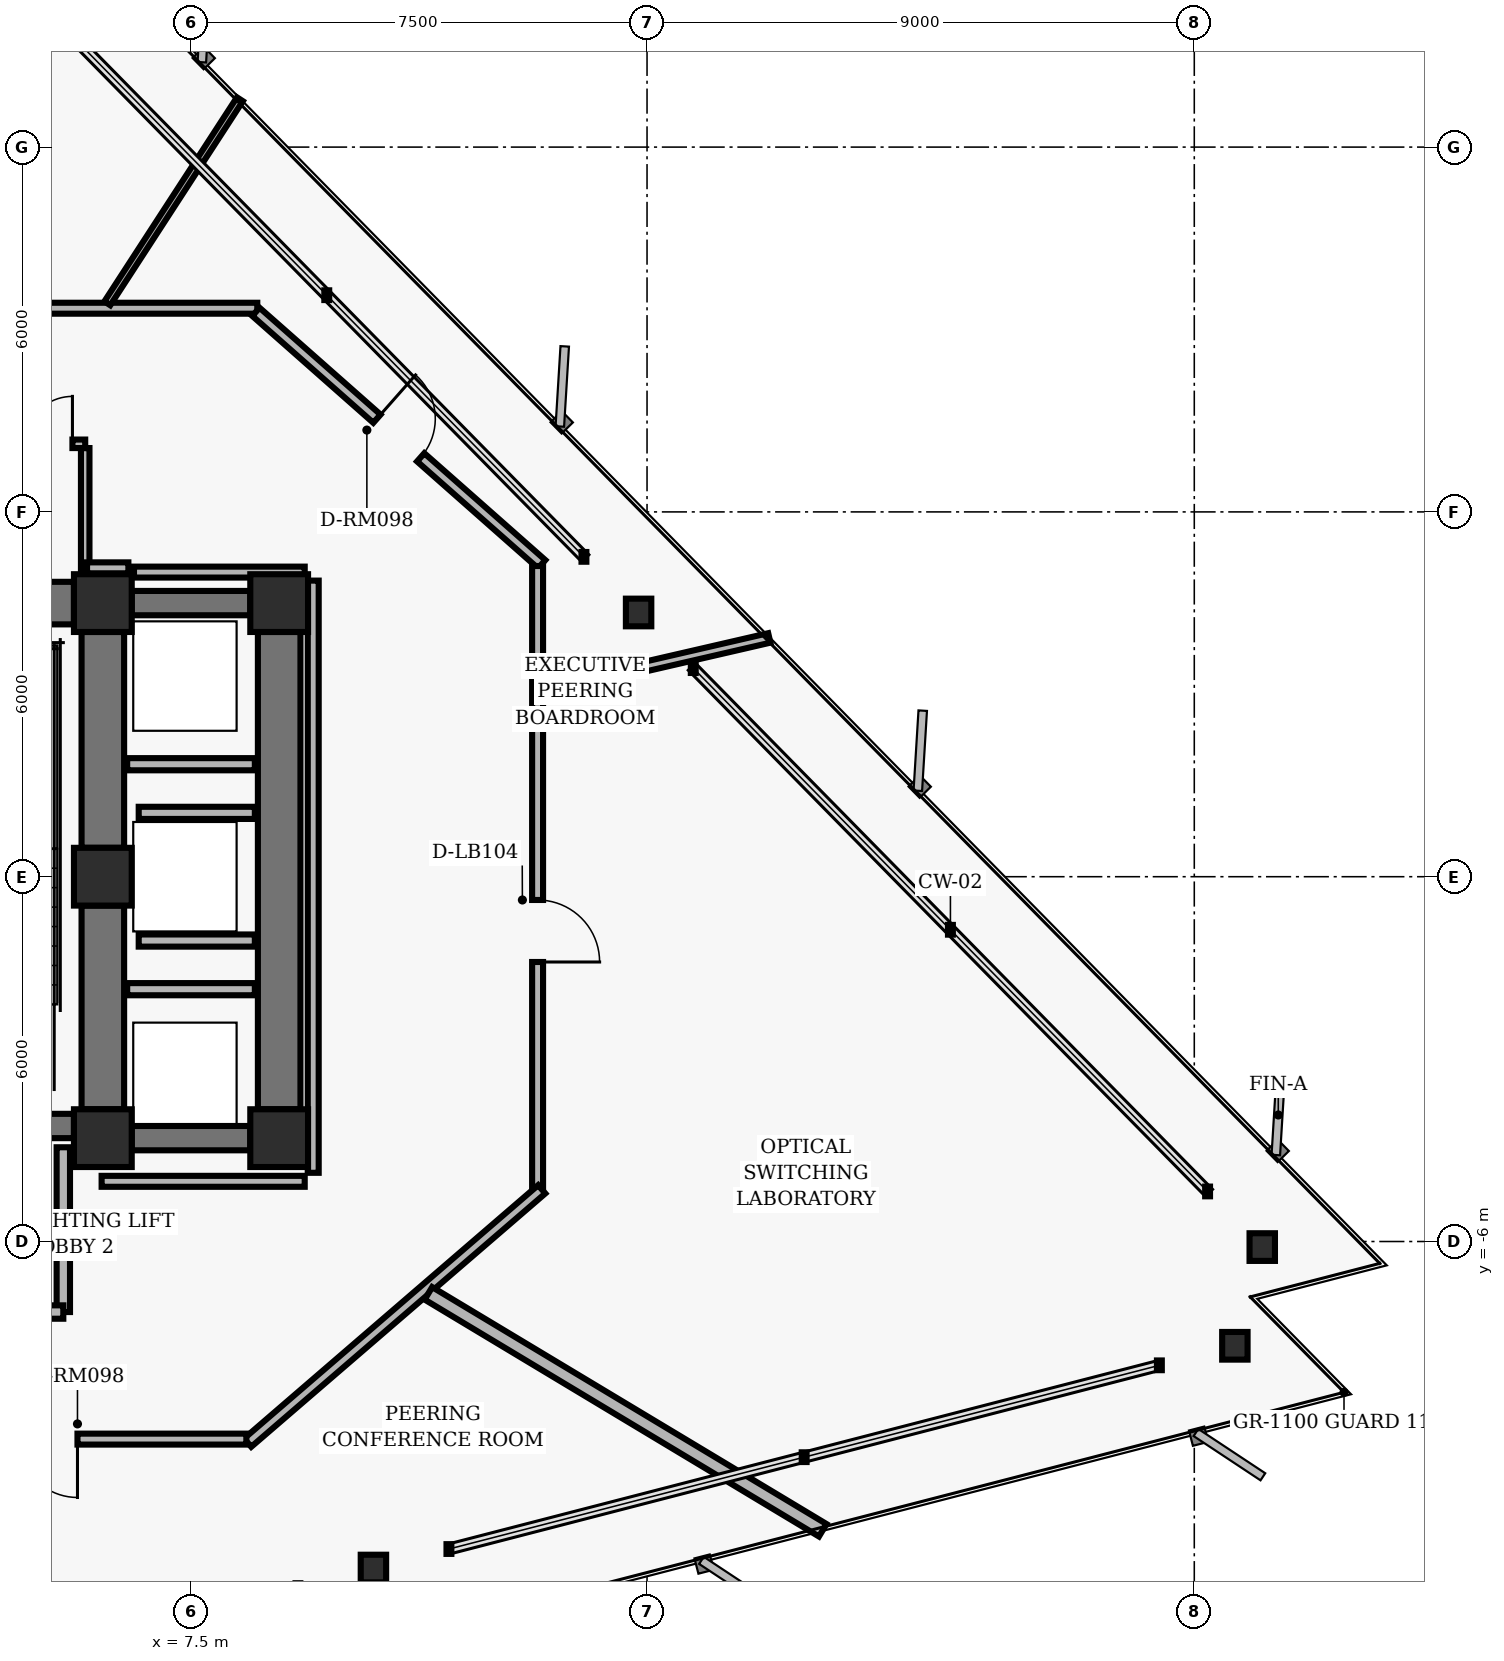
"""IFC4 building model, lengths in metres.
Left out: names, types, materials, properties, quantities, classifications, styles, units other than length and angle.
Written with IfcOpenShell. Run it as: python <this file> out.ifc"""

import sys

from ifc_helpers import new_model, si_unit, direction, frame, frame_2d, origin, origin_2d, place, context, subcontext, project, spatial, rectangle, hollow_rectangle, i_section, extrude, element, fill, save


model = new_model("IFC4")
c1 = context("Model", 3, precision=1e-05, world=origin(), true_north=direction((0.0, 1.0)))
c2 = subcontext(c1, "Body", "Model", "MODEL_VIEW")
j1 = project(units=[si_unit("LENGTHUNIT", "METRE"), si_unit("PLANEANGLEUNIT", "RADIAN")], contexts=[c1])
p1 = place(None, origin())
s1 = spatial("IfcSite", under=j1, at=p1, CompositionType="ELEMENT")
p2 = place(p1, origin())
s2 = spatial("IfcBuilding", under=s1, at=p2, CompositionType="ELEMENT")
p3 = place(p2, frame((0.0, 0.0, 76.48)))
s3 = spatial("IfcBuildingStorey", under=s2, at=p3, CompositionType="ELEMENT", Elevation=76.48)
for number, where, z_axis, x_axis in (
    (1, (6.05, 4.5, 0.0), (0.0, 0.0, 1.0), (1.0, 0.0, 0.0)),
    (2, (6.05, 0.0, 0.0), (0.0, 0.0, 1.0), (1.0, 0.0, 0.0)),
    (3, (6.05, -4.3, 0.0), (0.0, 0.0, 1.0), (1.0, 0.0, 0.0)),
    (4, (8.95, 4.5, 0.0), (0.0, 0.0, 1.0), (1.0, 0.0, 0.0)),
    (5, (8.95, -4.3, 0.0), (0.0, 0.0, 1.0), (1.0, 0.0, 0.0)),
):
    element("IfcColumn", number, at=place(p3, frame(where, z_axis=z_axis, x_axis=x_axis)), inside=s3, PredefinedType="COLUMN", context=c2, shape_type="SweptSolid", body=[
        extrude(hollow_rectangle(XDim=0.95, YDim=0.95, WallThickness=0.06, InnerFilletRadius=0.02, OuterFilletRadius=0.04, at=origin_2d()), origin(), (0.0, 0.0, 1.0), 3.04),
    ])
p4 = place(p3, frame((6.05, 0.475, 0.0), z_axis=(0.0, 0.0, 1.0), x_axis=(0.0, 1.0, 0.0)))
e6 = element("IfcWall", 6, at=p4, inside=s3, PredefinedType="SHEAR", context=c2, shape_type="SweptSolid", body=[
    extrude(rectangle(XDim=3.55, YDim=0.7, at=frame_2d((1.775, 0.0))), origin(), (0.0, 0.0, 1.0), 2.788),
])
p5 = place(p3, frame((6.05, -3.825, 0.0), z_axis=(0.0, 0.0, 1.0), x_axis=(0.0, 1.0, 0.0)))
e7 = element("IfcWall", 7, at=p5, inside=s3, PredefinedType="SHEAR", context=c2, shape_type="SweptSolid", body=[
    extrude(rectangle(XDim=3.35, YDim=0.7, at=frame_2d((1.675, 0.0))), origin(), (0.0, 0.0, 1.0), 2.788),
])
p6 = place(p3, frame((-5.575, -4.1, 0.0), z_axis=(0.0, 0.0, 1.0), x_axis=(1.0, 0.0, 0.0)))
e8 = element("IfcWall", 8, at=p6, inside=s3, PredefinedType="SHEAR", context=c2, shape_type="SweptSolid", body=[
    extrude(rectangle(XDim=11.15, YDim=0.4, at=frame_2d((5.575, 0.0))), origin(), (0.0, 0.0, 1.0), 2.788),
])
p7 = place(p6, frame((1.305, 0.0, 0.0)))
e9 = element("IfcOpeningElement", 9, at=p7, cuts=e8, PredefinedType="OPENING", context=c2, shape_type="SweptSolid", body=[
    extrude(rectangle(XDim=1.1, YDim=2.04, at=frame_2d((0.55, 1.02))), frame((0.0, 0.21, 0.0), z_axis=(0.0, -1.0, 0.0), x_axis=(1.0, 0.0, 0.0)), (0.0, 0.0, 1.0), 0.42),
])
p8 = place(p6, frame((8.745, 0.0, 0.0)))
e10 = element("IfcOpeningElement", 10, at=p8, cuts=e8, PredefinedType="OPENING", context=c2, shape_type="SweptSolid", body=[
    extrude(rectangle(XDim=1.1, YDim=2.04, at=frame_2d((0.55, 1.02))), frame((0.0, 0.21, 0.0), z_axis=(0.0, -1.0, 0.0), x_axis=(1.0, 0.0, 0.0)), (0.0, 0.0, 1.0), 0.42),
])
p9 = place(p6, frame((4.045, 0.0, 0.0)))
e11 = element("IfcOpeningElement", 11, at=p9, cuts=e8, PredefinedType="OPENING", context=c2, shape_type="SweptSolid", body=[
    extrude(rectangle(XDim=1.06, YDim=2.04, at=frame_2d((0.53, 1.02))), frame((0.0, 0.21, 0.0), z_axis=(0.0, -1.0, 0.0), x_axis=(1.0, 0.0, 0.0)), (0.0, 0.0, 1.0), 0.42),
])
p10 = place(p6, frame((6.045, 0.0, 0.0)))
e12 = element("IfcOpeningElement", 12, at=p10, cuts=e8, PredefinedType="OPENING", context=c2, shape_type="SweptSolid", body=[
    extrude(rectangle(XDim=1.06, YDim=2.04, at=frame_2d((0.53, 1.02))), frame((0.0, 0.21, 0.0), z_axis=(0.0, -1.0, 0.0), x_axis=(1.0, 0.0, 0.0)), (0.0, 0.0, 1.0), 0.42),
])
p11 = place(p3, frame((2.05, 4.5, 0.0), z_axis=(0.0, 0.0, 1.0), x_axis=(1.0, 0.0, 0.0)))
e13 = element("IfcWall", 13, at=p11, inside=s3, PredefinedType="SHEAR", context=c2, shape_type="SweptSolid", body=[
    extrude(rectangle(XDim=3.525, YDim=0.7, at=frame_2d((1.762, 0.0))), origin(), (0.0, 0.0, 1.0), 2.788),
])
p12 = place(p3, frame((8.95, -3.825, 0.0), z_axis=(0.0, 0.0, 1.0), x_axis=(0.0, 1.0, 0.0)))
e14 = element("IfcWall", 14, at=p12, inside=s3, PredefinedType="SHEAR", context=c2, shape_type="SweptSolid", body=[
    extrude(rectangle(XDim=7.85, YDim=0.7, at=frame_2d((3.925, 0.0))), origin(), (0.0, 0.0, 1.0), 2.788),
])
for number, where, z_axis, x_axis in (
    (15, (6.525, 4.5, 0.0), (0.0, 0.0, 1.0), (1.0, 0.0, 0.0)),
    (16, (6.525, -4.3, 0.0), (0.0, 0.0, 1.0), (1.0, 0.0, 0.0)),
):
    element("IfcWall", number, at=place(p3, frame(where, z_axis=z_axis, x_axis=x_axis)), inside=s3, PredefinedType="SHEAR", context=c2, shape_type="SweptSolid", body=[
        extrude(rectangle(XDim=1.95, YDim=0.4, at=frame_2d((0.975, 0.0))), origin(), (0.0, 0.0, 1.0), 2.788),
    ])
for number, where, z_axis, x_axis in (
    (17, (25.118, -6.092, 0.0), (0.0, 0.0, 1.0), (1.0, 0.0, 0.0)),
    (18, (14.861, 4.346, 0.0), (0.0, 0.0, 1.0), (1.0, 0.0, 0.0)),
    (19, (10.5, -11.379, 0.0), (0.0, 0.0, 1.0), (1.0, 0.0, 0.0)),
    (20, (24.667, -7.715, 0.0), (0.0, 0.0, 1.0), (1.0, 0.0, 0.0)),
):
    element("IfcColumn", number, at=place(p3, frame(where, z_axis=z_axis, x_axis=x_axis)), inside=s3, PredefinedType="COLUMN", context=c2, shape_type="SweptSolid", body=[
        extrude(i_section(OverallWidth=0.418, OverallDepth=0.455, WebThickness=0.042, FlangeThickness=0.068, FilletRadius=0.025, at=origin_2d()), origin(), (0.0, 0.0, 1.0), 3.04),
    ])
p13 = place(p3, frame((5.4, -7.16, 0.0), z_axis=(0.0, 0.0, 1.0), x_axis=(0.0, 1.0, 0.0)))
e21 = element("IfcWall", 21, at=p13, inside=s3, PredefinedType="PARTITIONING", context=c2, shape_type="SweptSolid", body=[
    extrude(rectangle(XDim=2.71, YDim=0.22, at=frame_2d((1.355, 0.0))), origin(), (0.0, 0.0, 1.0), 2.763),
])
p14 = place(p3, frame((0.0, -7.16, 0.0), z_axis=(0.0, 0.0, 1.0), x_axis=(1.0, 0.0, 0.0)))
e22 = element("IfcWall", 22, at=p14, inside=s3, PredefinedType="PARTITIONING", context=c2, shape_type="SweptSolid", body=[
    extrude(rectangle(XDim=5.4, YDim=0.22, at=frame_2d((2.7, 0.0))), origin(), (0.0, 0.0, 1.0), 2.763),
])
p15 = place(p14, frame((2.05, 0.0, 0.0)))
e23 = element("IfcOpeningElement", 23, at=p15, cuts=e22, PredefinedType="OPENING", context=c2, shape_type="SweptSolid", body=[
    extrude(rectangle(XDim=1.12, YDim=2.02, at=frame_2d((0.56, 1.01))), frame((0.0, 0.12, 0.0), z_axis=(0.0, -1.0, 0.0), x_axis=(1.0, 0.0, 0.0)), (0.0, 0.0, 1.0), 0.24),
])
p16 = place(p3, frame((5.76, 4.95, 0.0), z_axis=(0.0, 0.0, 1.0), x_axis=(0.0, 1.0, 0.0)))
e24 = element("IfcWall", 24, at=p16, inside=s3, PredefinedType="PARTITIONING", context=c2, shape_type="SweptSolid", body=[
    extrude(rectangle(XDim=2.1, YDim=0.14, at=frame_2d((1.05, 0.0))), origin(), (0.0, 0.0, 1.0), 2.763),
])
p17 = place(p3, frame((4.56, 7.12, 0.0), z_axis=(0.0, 0.0, 1.0), x_axis=(1.0, 0.0, 0.0)))
e25 = element("IfcWall", 25, at=p17, inside=s3, PredefinedType="PARTITIONING", context=c2, shape_type="SweptSolid", body=[
    extrude(rectangle(XDim=1.2, YDim=0.14, at=frame_2d((0.6, 0.0))), origin(), (0.0, 0.0, 1.0), 2.763),
])
p18 = place(p17, frame((0.21, 0.0, 0.0)))
e26 = element("IfcOpeningElement", 26, at=p18, cuts=e25, PredefinedType="OPENING", context=c2, shape_type="SweptSolid", body=[
    extrude(rectangle(XDim=0.78, YDim=2.01, at=frame_2d((0.39, 1.005))), frame((0.0, 0.08, 0.0), z_axis=(0.0, -1.0, 0.0), x_axis=(1.0, 0.0, 0.0)), (0.0, 0.0, 1.0), 0.16),
])
for number, where, z_axis, x_axis in (
    (27, (6.45, -1.85, 0.0), (0.0, 0.0, 1.0), (1.0, 0.0, 0.0)),
    (28, (6.45, 1.85, 0.0), (0.0, 0.0, 1.0), (1.0, 0.0, 0.0)),
):
    element("IfcWall", number, at=place(p3, frame(where, z_axis=z_axis, x_axis=x_axis)), inside=s3, PredefinedType="PARTITIONING", context=c2, shape_type="SweptSolid", body=[
        extrude(rectangle(XDim=2.1, YDim=0.2, at=frame_2d((1.05, 0.0))), origin(), (0.0, 0.0, 1.0), 2.763),
    ])
for number, where, z_axis, x_axis in (
    (29, (6.64, -1.05, 0.0), (0.0, 0.0, 1.0), (1.0, 0.0, 0.0)),
    (30, (6.64, 1.05, 0.0), (0.0, 0.0, 1.0), (1.0, 0.0, 0.0)),
):
    element("IfcWall", number, at=place(p3, frame(where, z_axis=z_axis, x_axis=x_axis)), inside=s3, PredefinedType="PARTITIONING", context=c2, shape_type="SweptSolid", body=[
        extrude(rectangle(XDim=1.91, YDim=0.2, at=frame_2d((0.955, 0.0))), origin(), (0.0, 0.0, 1.0), 2.763),
    ])
p19 = place(p3, frame((-8.59, 9.35, 0.0), z_axis=(0.0, 0.0, 1.0), x_axis=(1.0, 0.0, 0.0)))
e31 = element("IfcWall", 31, at=p19, inside=s3, PredefinedType="PARTITIONING", context=c2, shape_type="SweptSolid", body=[
    extrude(rectangle(XDim=17.18, YDim=0.18, at=frame_2d((8.59, 0.0))), origin(), (0.0, 0.0, 1.0), 2.277),
])
p20 = place(p19, frame((10.261, 0.0, 0.0)))
e32 = element("IfcOpeningElement", 32, at=p20, cuts=e31, PredefinedType="OPENING", context=c2, shape_type="SweptSolid", body=[
    extrude(rectangle(XDim=0.96, YDim=2.02, at=frame_2d((0.48, 1.01))), frame((0.0, 0.1, 0.0), z_axis=(0.0, -1.0, 0.0), x_axis=(1.0, 0.0, 0.0)), (0.0, 0.0, 1.0), 0.2),
])
p21 = place(p19, frame((3.028, 0.0, 0.0)))
e33 = element("IfcOpeningElement", 33, at=p21, cuts=e31, PredefinedType="OPENING", context=c2, shape_type="SweptSolid", body=[
    extrude(rectangle(XDim=0.96, YDim=2.02, at=frame_2d((0.48, 1.01))), frame((0.0, 0.1, 0.0), z_axis=(0.0, -1.0, 0.0), x_axis=(1.0, 0.0, 0.0)), (0.0, 0.0, 1.0), 0.2),
])
p22 = place(p3, frame((8.567, 9.29, 0.0), z_axis=(0.0, 0.0, 1.0), x_axis=(0.749626463267, -0.66186113768, 0.0)))
e34 = element("IfcWall", 34, at=p22, inside=s3, PredefinedType="PARTITIONING", context=c2, shape_type="SweptSolid", body=[
    extrude(rectangle(XDim=6.27, YDim=0.18, at=frame_2d((3.135, 0.0))), origin(), (0.0, 0.0, 1.0), 2.277),
])
p23 = place(p22, frame((2.655, 0.0, 0.0)))
e35 = element("IfcOpeningElement", 35, at=p23, cuts=e34, PredefinedType="OPENING", context=c2, shape_type="SweptSolid", body=[
    extrude(rectangle(XDim=0.96, YDim=2.02, at=frame_2d((0.48, 1.01))), frame((0.0, 0.1, 0.0), z_axis=(0.0, -1.0, 0.0), x_axis=(1.0, 0.0, 0.0)), (0.0, 0.0, 1.0), 0.2),
])
p24 = place(p3, frame((13.2, 5.11, 0.0), z_axis=(0.0, 0.0, 1.0), x_axis=(0.0, -1.0, 0.0)))
e36 = element("IfcWall", 36, at=p24, inside=s3, PredefinedType="PARTITIONING", context=c2, shape_type="SweptSolid", body=[
    extrude(rectangle(XDim=10.22, YDim=0.18, at=frame_2d((5.11, 0.0))), origin(), (0.0, 0.0, 1.0), 2.277),
])
p25 = place(p24, frame((5.493, 0.0, 0.0)))
e37 = element("IfcOpeningElement", 37, at=p25, cuts=e36, PredefinedType="OPENING", context=c2, shape_type="SweptSolid", body=[
    extrude(rectangle(XDim=1.02, YDim=2.02, at=frame_2d((0.51, 1.01))), frame((0.0, 0.1, 0.0), z_axis=(0.0, -1.0, 0.0), x_axis=(1.0, 0.0, 0.0)), (0.0, 0.0, 1.0), 0.2),
])
p26 = place(p3, frame((13.268, -5.141, 0.0), z_axis=(0.0, 0.0, 1.0), x_axis=(-0.757534501725, -0.65279512766, 0.0)))
e38 = element("IfcWall", 38, at=p26, inside=s3, PredefinedType="PARTITIONING", context=c2, shape_type="SweptSolid", body=[
    extrude(rectangle(XDim=6.385, YDim=0.18, at=frame_2d((3.192, 0.0))), origin(), (0.0, 0.0, 1.0), 2.763),
])
p27 = place(p3, frame((8.41, -9.25, 0.0), z_axis=(0.0, 0.0, 1.0), x_axis=(-1.0, 0.0, 0.0)))
e39 = element("IfcWall", 39, at=p27, inside=s3, PredefinedType="PARTITIONING", context=c2, shape_type="SweptSolid", body=[
    extrude(rectangle(XDim=17.0, YDim=0.18, at=frame_2d((8.5, 0.0))), origin(), (0.0, 0.0, 1.0), 2.277),
])
p28 = place(p27, frame((9.888, 0.0, 0.0)))
e40 = element("IfcOpeningElement", 40, at=p28, cuts=e39, PredefinedType="OPENING", context=c2, shape_type="SweptSolid", body=[
    extrude(rectangle(XDim=0.96, YDim=2.02, at=frame_2d((0.48, 1.01))), frame((0.0, 0.1, 0.0), z_axis=(0.0, -1.0, 0.0), x_axis=(1.0, 0.0, 0.0)), (0.0, 0.0, 1.0), 0.2),
])
p29 = place(p27, frame((2.777, 0.0, 0.0)))
e41 = element("IfcOpeningElement", 41, at=p29, cuts=e39, PredefinedType="OPENING", context=c2, shape_type="SweptSolid", body=[
    extrude(rectangle(XDim=0.96, YDim=2.02, at=frame_2d((0.48, 1.01))), frame((0.0, 0.1, 0.0), z_axis=(0.0, -1.0, 0.0), x_axis=(1.0, 0.0, 0.0)), (0.0, 0.0, 1.0), 0.2),
])
p30 = place(p3, frame((6.03, -5.01, 0.0), z_axis=(0.0, 0.0, 1.0), x_axis=(1.0, 0.0, 0.0)))
e42 = element("IfcWall", 42, at=p30, inside=s3, PredefinedType="PARTITIONING", context=c2, shape_type="SweptSolid", body=[
    extrude(rectangle(XDim=3.34, YDim=0.18, at=frame_2d((1.67, 0.0))), origin(), (0.0, 0.0, 1.0), 2.763),
])
p31 = place(p3, frame((9.51, -4.87, 0.0), z_axis=(0.0, 0.0, 1.0), x_axis=(0.0, 1.0, 0.0)))
e43 = element("IfcWall", 43, at=p31, inside=s3, PredefinedType="PARTITIONING", context=c2, shape_type="SweptSolid", body=[
    extrude(rectangle(XDim=9.74, YDim=0.18, at=frame_2d((4.87, 0.0))), origin(), (0.0, 0.0, 1.0), 2.048),
])
p32 = place(p3, frame((9.37, 5.01, 0.0), z_axis=(0.0, 0.0, 1.0), x_axis=(-1.0, 0.0, 0.0)))
e44 = element("IfcWall", 44, at=p32, inside=s3, PredefinedType="PARTITIONING", context=c2, shape_type="SweptSolid", body=[
    extrude(rectangle(XDim=2.808, YDim=0.18, at=frame_2d((1.404, 0.0))), origin(), (0.0, 0.0, 1.0), 2.763),
])
p33 = place(p3, frame((6.47, 5.08, 0.0), z_axis=(0.0, 0.0, 1.0), x_axis=(-1.0, 0.0, 0.0)))
e45 = element("IfcWall", 45, at=p33, inside=s3, PredefinedType="PARTITIONING", context=c2, shape_type="SweptSolid", body=[
    extrude(rectangle(XDim=0.68, YDim=0.18, at=frame_2d((0.34, 0.0))), origin(), (0.0, 0.0, 1.0), 2.763),
])
p34 = place(p3, frame((11.405, -6.853, 0.0), z_axis=(0.0, 0.0, 1.0), x_axis=(0.857165278127, -0.515041441025, 0.0)))
e46 = element("IfcWall", 46, at=p34, inside=s3, PredefinedType="PARTITIONING", context=c2, shape_type="SweptSolid", body=[
    extrude(rectangle(XDim=7.565, YDim=0.24, at=frame_2d((3.782, 0.0))), origin(), (0.0, 0.0, 1.0), 2.763),
])
p35 = place(p3, frame((13.28, 3.066, 0.0), z_axis=(0.0, 0.0, 1.0), x_axis=(0.974371849336, 0.224943324464, 0.0)))
e47 = element("IfcWall", 47, at=p35, inside=s3, PredefinedType="PARTITIONING", context=c2, shape_type="SweptSolid", body=[
    extrude(rectangle(XDim=3.829, YDim=0.16, at=frame_2d((1.915, 0.0))), origin(), (0.0, 0.0, 1.0), 2.763),
])
p36 = place(p3, frame((6.124, 9.43, 0.0), z_axis=(0.0, 0.0, 1.0), x_axis=(0.544653909872, 0.838660907912, 0.0)))
e48 = element("IfcWall", 48, at=p36, inside=s3, PredefinedType="MOVABLE", context=c2, shape_type="SweptSolid", body=[
    extrude(rectangle(XDim=4.003, YDim=0.115, at=frame_2d((2.002, 0.0))), origin(), (0.0, 0.0, 1.0), 2.763),
])
p37 = place(p18, origin())
e49 = element("IfcDoor", 49, at=p37, inside=s3, OperationType="SINGLE_SWING_RIGHT", PredefinedType="DOOR", context=c2, shape_type="SweptSolid", body=[
    extrude(rectangle(XDim=0.78, YDim=2.01, at=frame_2d((0.39, 1.005))), frame((0.0, 0.025, 0.0), z_axis=(0.0, -1.0, 0.0), x_axis=(1.0, 0.0, 0.0)), (0.0, 0.0, 1.0), 0.05),
])
fill(e26, e49)
p38 = place(p29, origin())
e50 = element("IfcDoor", 50, at=p38, inside=s3, OperationType="SINGLE_SWING_LEFT", PredefinedType="DOOR", context=c2, shape_type="SweptSolid", body=[
    extrude(rectangle(XDim=0.96, YDim=2.02, at=frame_2d((0.48, 1.01))), frame((0.0, 0.025, 0.0), z_axis=(0.0, -1.0, 0.0), x_axis=(1.0, 0.0, 0.0)), (0.0, 0.0, 1.0), 0.05),
])
fill(e41, e50)
p39 = place(p25, origin())
e51 = element("IfcDoor", 51, at=p39, inside=s3, OperationType="SINGLE_SWING_RIGHT", PredefinedType="DOOR", context=c2, shape_type="SweptSolid", body=[
    extrude(rectangle(XDim=1.02, YDim=2.02, at=frame_2d((0.51, 1.01))), frame((0.0, 0.025, 0.0), z_axis=(0.0, -1.0, 0.0), x_axis=(1.0, 0.0, 0.0)), (0.0, 0.0, 1.0), 0.05),
])
fill(e37, e51)
p40 = place(p23, origin())
e52 = element("IfcDoor", 52, at=p40, inside=s3, OperationType="SINGLE_SWING_LEFT", PredefinedType="DOOR", context=c2, shape_type="SweptSolid", body=[
    extrude(rectangle(XDim=0.96, YDim=2.02, at=frame_2d((0.48, 1.01))), frame((0.0, 0.025, 0.0), z_axis=(0.0, -1.0, 0.0), x_axis=(1.0, 0.0, 0.0)), (0.0, 0.0, 1.0), 0.05),
])
fill(e35, e52)
save(model, sys.argv[1])
